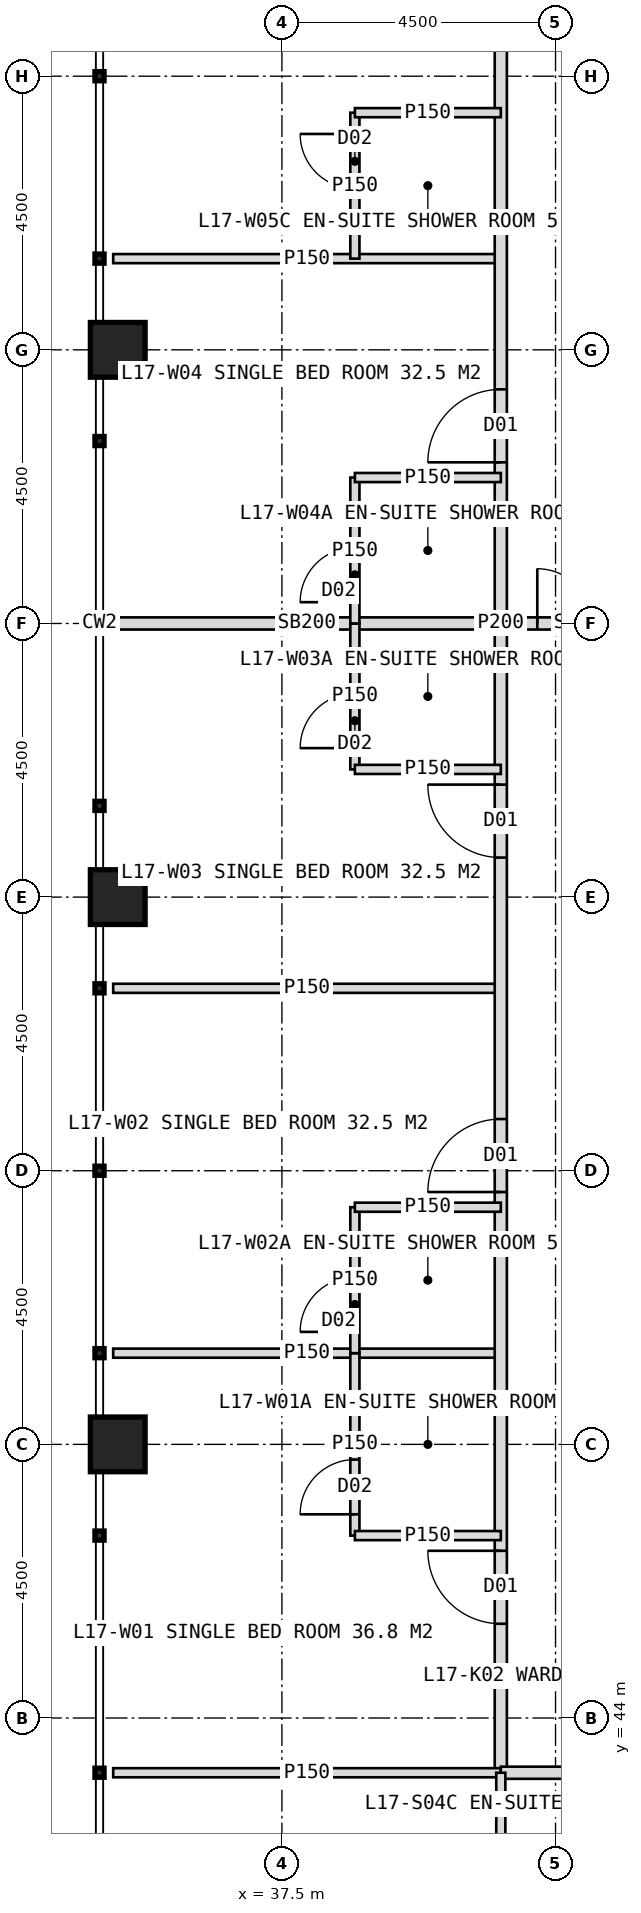
"""IFC4 building model, lengths in metres.
Left out: names, types, materials, properties, quantities, classifications, styles, units other than length and angle.
Written with IfcOpenShell. Run it as: python <this file> out.ifc"""

import sys

from ifc_helpers import new_model, si_unit, direction, frame, frame_2d, origin, origin_2d, place, context, subcontext, project, spatial, rectangle, hollow_rectangle, extrude, element, fill, save


model = new_model("IFC4")
c1 = context("Model", 3, precision=1e-05, world=origin(), true_north=direction((0.0, 1.0)))
c2 = subcontext(c1, "Body", "Model", "MODEL_VIEW")
j1 = project(units=[si_unit("LENGTHUNIT", "METRE"), si_unit("PLANEANGLEUNIT", "RADIAN")], contexts=[c1])
p1 = place(None, origin())
s1 = spatial("IfcSite", under=j1, at=p1, CompositionType="ELEMENT")
p2 = place(p1, origin())
s2 = spatial("IfcBuilding", under=s1, at=p2, CompositionType="ELEMENT")
p3 = place(p2, frame((0.0, 0.0, 75.0)))
s3 = spatial("IfcBuildingStorey", under=s2, at=p3, CompositionType="ELEMENT", Elevation=75.0)
for number, where, z_axis, x_axis in (
    (1, (34.8, 48.5, 0.0), (0.0, 0.0, 1.0), (1.0, 0.0, 0.0)),
    (2, (34.8, 57.5, 0.0), (0.0, 0.0, 1.0), (1.0, 0.0, 0.0)),
    (3, (34.8, 66.5, 0.0), (0.0, 0.0, 1.0), (1.0, 0.0, 0.0)),
):
    element("IfcColumn", number, at=place(p3, frame(where, z_axis=z_axis, x_axis=x_axis)), inside=s3, PredefinedType="COLUMN", context=c2, shape_type="SweptSolid", body=[
        extrude(hollow_rectangle(XDim=0.9, YDim=0.9, WallThickness=0.08, at=origin_2d()), origin(), (0.0, 0.0, 1.0), 4.0),
    ])
for number, where, z_axis, x_axis in (
    (4, (41.1, 50.0, 0.0), (0.0, 0.0, 1.0), (-1.0, 0.0, 0.0)),
    (5, (41.1, 56.0, 0.0), (0.0, 0.0, 1.0), (-1.0, 0.0, 0.0)),
):
    element("IfcWall", number, at=place(p3, frame(where, z_axis=z_axis, x_axis=x_axis)), inside=s3, PredefinedType="PARTITIONING", context=c2, shape_type="SweptSolid", body=[
        extrude(rectangle(XDim=6.375, YDim=0.15, at=frame_2d((3.188, 0.0))), origin(), (0.0, 0.0, 1.0), 3.75),
    ])
p4 = place(p3, frame((41.1, 62.0, 0.0), z_axis=(0.0, 0.0, 1.0), x_axis=(-1.0, 0.0, 0.0)))
e6 = element("IfcWall", 6, at=p4, inside=s3, PredefinedType="SOLIDWALL", context=c2, shape_type="SweptSolid", body=[
    extrude(rectangle(XDim=6.375, YDim=0.2, at=frame_2d((3.188, 0.0))), origin(), (0.0, 0.0, 1.0), 2.75),
])
p5 = place(p3, frame((41.1, 68.0, 0.0), z_axis=(0.0, 0.0, 1.0), x_axis=(-1.0, 0.0, 0.0)))
e7 = element("IfcWall", 7, at=p5, inside=s3, PredefinedType="PARTITIONING", context=c2, shape_type="SweptSolid", body=[
    extrude(rectangle(XDim=6.375, YDim=0.15, at=frame_2d((3.188, 0.0))), origin(), (0.0, 0.0, 1.0), 3.75),
])
p6 = place(p3, frame((41.1, 43.1, 0.0), z_axis=(0.0, 0.0, 1.0), x_axis=(0.0, 1.0, 0.0)))
e8 = element("IfcWall", 8, at=p6, inside=s3, PredefinedType="PARTITIONING", context=c2, shape_type="SweptSolid", body=[
    extrude(rectangle(XDim=37.8, YDim=0.2, at=frame_2d((18.9, 0.0))), origin(), (0.0, 0.0, 1.0), 3.75),
])
p7 = place(p6, frame((2.45, 0.0, 0.0)))
e9 = element("IfcOpeningElement", 9, at=p7, cuts=e8, PredefinedType="OPENING", context=c2, shape_type="SweptSolid", body=[
    extrude(rectangle(XDim=1.2, YDim=2.2, at=frame_2d((0.6, 1.1))), frame((0.0, 0.11, 0.0), z_axis=(0.0, -1.0, 0.0), x_axis=(1.0, 0.0, 0.0)), (0.0, 0.0, 1.0), 0.22),
])
p8 = place(p6, frame((9.55, 0.0, 0.0)))
e10 = element("IfcOpeningElement", 10, at=p8, cuts=e8, PredefinedType="OPENING", context=c2, shape_type="SweptSolid", body=[
    extrude(rectangle(XDim=1.2, YDim=2.2, at=frame_2d((0.6, 1.1))), frame((0.0, 0.11, 0.0), z_axis=(0.0, -1.0, 0.0), x_axis=(1.0, 0.0, 0.0)), (0.0, 0.0, 1.0), 0.22),
])
p9 = place(p6, frame((15.05, 0.0, 0.0)))
e11 = element("IfcOpeningElement", 11, at=p9, cuts=e8, PredefinedType="OPENING", context=c2, shape_type="SweptSolid", body=[
    extrude(rectangle(XDim=1.2, YDim=2.2, at=frame_2d((0.6, 1.1))), frame((0.0, 0.11, 0.0), z_axis=(0.0, -1.0, 0.0), x_axis=(1.0, 0.0, 0.0)), (0.0, 0.0, 1.0), 0.22),
])
p10 = place(p6, frame((21.55, 0.0, 0.0)))
e12 = element("IfcOpeningElement", 12, at=p10, cuts=e8, PredefinedType="OPENING", context=c2, shape_type="SweptSolid", body=[
    extrude(rectangle(XDim=1.2, YDim=2.2, at=frame_2d((0.6, 1.1))), frame((0.0, 0.11, 0.0), z_axis=(0.0, -1.0, 0.0), x_axis=(1.0, 0.0, 0.0)), (0.0, 0.0, 1.0), 0.22),
])
p11 = place(p6, frame((33.95, 0.0, 0.0)))
e13 = element("IfcOpeningElement", 13, at=p11, cuts=e8, PredefinedType="OPENING", context=c2, shape_type="SweptSolid", body=[
    extrude(rectangle(XDim=1.2, YDim=2.2, at=frame_2d((0.6, 1.1))), frame((0.0, 0.11, 0.0), z_axis=(0.0, -1.0, 0.0), x_axis=(1.0, 0.0, 0.0)), (0.0, 0.0, 1.0), 0.22),
])
p12 = place(p3, frame((41.1, 43.1, 0.0), z_axis=(0.0, 0.0, 1.0), x_axis=(-1.0, 0.0, 0.0)))
e14 = element("IfcWall", 14, at=p12, inside=s3, PredefinedType="PARTITIONING", context=c2, shape_type="SweptSolid", body=[
    extrude(rectangle(XDim=6.375, YDim=0.15, at=frame_2d((3.188, 0.0))), origin(), (0.0, 0.0, 1.0), 3.75),
])
p13 = place(p3, frame((38.7, 47.0, 0.0), z_axis=(0.0, 0.0, 1.0), x_axis=(0.0, 1.0, 0.0)))
e15 = element("IfcWall", 15, at=p13, inside=s3, PredefinedType="PARTITIONING", context=c2, shape_type="SweptSolid", body=[
    extrude(rectangle(XDim=3.0, YDim=0.15, at=frame_2d((1.5, 0.0))), origin(), (0.0, 0.0, 1.0), 3.75),
])
p14 = place(p13, frame((0.35, 0.0, 0.0)))
e16 = element("IfcOpeningElement", 16, at=p14, cuts=e15, PredefinedType="OPENING", context=c2, shape_type="SweptSolid", body=[
    extrude(rectangle(XDim=0.9, YDim=2.1, at=frame_2d((0.45, 1.05))), frame((0.0, 0.085, 0.0), z_axis=(0.0, -1.0, 0.0), x_axis=(1.0, 0.0, 0.0)), (0.0, 0.0, 1.0), 0.17),
])
p15 = place(p3, frame((41.1, 47.0, 0.0), z_axis=(0.0, 0.0, 1.0), x_axis=(-1.0, 0.0, 0.0)))
e17 = element("IfcWall", 17, at=p15, inside=s3, PredefinedType="PARTITIONING", context=c2, shape_type="SweptSolid", body=[
    extrude(rectangle(XDim=2.4, YDim=0.15, at=frame_2d((1.2, 0.0))), origin(), (0.0, 0.0, 1.0), 3.75),
])
p16 = place(p3, frame((38.7, 50.0, 0.0), z_axis=(0.0, 0.0, 1.0), x_axis=(0.0, 1.0, 0.0)))
e18 = element("IfcWall", 18, at=p16, inside=s3, PredefinedType="PARTITIONING", context=c2, shape_type="SweptSolid", body=[
    extrude(rectangle(XDim=2.4, YDim=0.15, at=frame_2d((1.2, 0.0))), origin(), (0.0, 0.0, 1.0), 3.75),
])
p17 = place(p16, frame((0.35, 0.0, 0.0)))
e19 = element("IfcOpeningElement", 19, at=p17, cuts=e18, PredefinedType="OPENING", context=c2, shape_type="SweptSolid", body=[
    extrude(rectangle(XDim=0.9, YDim=2.1, at=frame_2d((0.45, 1.05))), frame((0.0, 0.085, 0.0), z_axis=(0.0, -1.0, 0.0), x_axis=(1.0, 0.0, 0.0)), (0.0, 0.0, 1.0), 0.17),
])
p18 = place(p3, frame((41.1, 52.4, 0.0), z_axis=(0.0, 0.0, 1.0), x_axis=(-1.0, 0.0, 0.0)))
e20 = element("IfcWall", 20, at=p18, inside=s3, PredefinedType="PARTITIONING", context=c2, shape_type="SweptSolid", body=[
    extrude(rectangle(XDim=2.4, YDim=0.15, at=frame_2d((1.2, 0.0))), origin(), (0.0, 0.0, 1.0), 3.75),
])
p19 = place(p3, frame((38.7, 59.6, 0.0), z_axis=(0.0, 0.0, 1.0), x_axis=(0.0, 1.0, 0.0)))
e21 = element("IfcWall", 21, at=p19, inside=s3, PredefinedType="PARTITIONING", context=c2, shape_type="SweptSolid", body=[
    extrude(rectangle(XDim=2.4, YDim=0.15, at=frame_2d((1.2, 0.0))), origin(), (0.0, 0.0, 1.0), 3.75),
])
p20 = place(p19, frame((0.35, 0.0, 0.0)))
e22 = element("IfcOpeningElement", 22, at=p20, cuts=e21, PredefinedType="OPENING", context=c2, shape_type="SweptSolid", body=[
    extrude(rectangle(XDim=0.9, YDim=2.1, at=frame_2d((0.45, 1.05))), frame((0.0, 0.085, 0.0), z_axis=(0.0, -1.0, 0.0), x_axis=(1.0, 0.0, 0.0)), (0.0, 0.0, 1.0), 0.17),
])
p21 = place(p3, frame((41.1, 59.6, 0.0), z_axis=(0.0, 0.0, 1.0), x_axis=(-1.0, 0.0, 0.0)))
e23 = element("IfcWall", 23, at=p21, inside=s3, PredefinedType="PARTITIONING", context=c2, shape_type="SweptSolid", body=[
    extrude(rectangle(XDim=2.4, YDim=0.15, at=frame_2d((1.2, 0.0))), origin(), (0.0, 0.0, 1.0), 3.75),
])
p22 = place(p3, frame((38.7, 62.0, 0.0), z_axis=(0.0, 0.0, 1.0), x_axis=(0.0, 1.0, 0.0)))
e24 = element("IfcWall", 24, at=p22, inside=s3, PredefinedType="PARTITIONING", context=c2, shape_type="SweptSolid", body=[
    extrude(rectangle(XDim=2.4, YDim=0.15, at=frame_2d((1.2, 0.0))), origin(), (0.0, 0.0, 1.0), 3.75),
])
p23 = place(p22, frame((0.35, 0.0, 0.0)))
e25 = element("IfcOpeningElement", 25, at=p23, cuts=e24, PredefinedType="OPENING", context=c2, shape_type="SweptSolid", body=[
    extrude(rectangle(XDim=0.9, YDim=2.1, at=frame_2d((0.45, 1.05))), frame((0.0, 0.085, 0.0), z_axis=(0.0, -1.0, 0.0), x_axis=(1.0, 0.0, 0.0)), (0.0, 0.0, 1.0), 0.17),
])
p24 = place(p3, frame((41.1, 64.4, 0.0), z_axis=(0.0, 0.0, 1.0), x_axis=(-1.0, 0.0, 0.0)))
e26 = element("IfcWall", 26, at=p24, inside=s3, PredefinedType="PARTITIONING", context=c2, shape_type="SweptSolid", body=[
    extrude(rectangle(XDim=2.4, YDim=0.15, at=frame_2d((1.2, 0.0))), origin(), (0.0, 0.0, 1.0), 3.75),
])
p25 = place(p3, frame((38.7, 68.0, 0.0), z_axis=(0.0, 0.0, 1.0), x_axis=(0.0, 1.0, 0.0)))
e27 = element("IfcWall", 27, at=p25, inside=s3, PredefinedType="PARTITIONING", context=c2, shape_type="SweptSolid", body=[
    extrude(rectangle(XDim=2.4, YDim=0.15, at=frame_2d((1.2, 0.0))), origin(), (0.0, 0.0, 1.0), 3.75),
])
p26 = place(p25, frame((1.15, 0.0, 0.0)))
e28 = element("IfcOpeningElement", 28, at=p26, cuts=e27, PredefinedType="OPENING", context=c2, shape_type="SweptSolid", body=[
    extrude(rectangle(XDim=0.9, YDim=2.1, at=frame_2d((0.45, 1.05))), frame((0.0, 0.085, 0.0), z_axis=(0.0, -1.0, 0.0), x_axis=(1.0, 0.0, 0.0)), (0.0, 0.0, 1.0), 0.17),
])
p27 = place(p3, frame((41.1, 70.4, 0.0), z_axis=(0.0, 0.0, 1.0), x_axis=(-1.0, 0.0, 0.0)))
e29 = element("IfcWall", 29, at=p27, inside=s3, PredefinedType="PARTITIONING", context=c2, shape_type="SweptSolid", body=[
    extrude(rectangle(XDim=2.4, YDim=0.15, at=frame_2d((1.2, 0.0))), origin(), (0.0, 0.0, 1.0), 3.75),
])
p28 = place(p3, frame((78.9, 43.1, 0.0), z_axis=(0.0, 0.0, 1.0), x_axis=(-1.0, 0.0, 0.0)))
e30 = element("IfcWall", 30, at=p28, inside=s3, PredefinedType="PARTITIONING", context=c2, shape_type="SweptSolid", body=[
    extrude(rectangle(XDim=37.8, YDim=0.2, at=frame_2d((18.9, 0.0))), origin(), (0.0, 0.0, 1.0), 3.75),
])
p29 = place(p28, frame((6.05, 0.0, 0.0)))
e31 = element("IfcOpeningElement", 31, at=p29, cuts=e30, PredefinedType="OPENING", context=c2, shape_type="SweptSolid", body=[
    extrude(rectangle(XDim=1.2, YDim=2.2, at=frame_2d((0.6, 1.1))), frame((0.0, 0.11, 0.0), z_axis=(0.0, -1.0, 0.0), x_axis=(1.0, 0.0, 0.0)), (0.0, 0.0, 1.0), 0.22),
])
p30 = place(p28, frame((12.55, 0.0, 0.0)))
e32 = element("IfcOpeningElement", 32, at=p30, cuts=e30, PredefinedType="OPENING", context=c2, shape_type="SweptSolid", body=[
    extrude(rectangle(XDim=1.2, YDim=2.2, at=frame_2d((0.6, 1.1))), frame((0.0, 0.11, 0.0), z_axis=(0.0, -1.0, 0.0), x_axis=(1.0, 0.0, 0.0)), (0.0, 0.0, 1.0), 0.22),
])
p31 = place(p28, frame((21.05, 0.0, 0.0)))
e33 = element("IfcOpeningElement", 33, at=p31, cuts=e30, PredefinedType="OPENING", context=c2, shape_type="SweptSolid", body=[
    extrude(rectangle(XDim=1.2, YDim=2.2, at=frame_2d((0.6, 1.1))), frame((0.0, 0.11, 0.0), z_axis=(0.0, -1.0, 0.0), x_axis=(1.0, 0.0, 0.0)), (0.0, 0.0, 1.0), 0.22),
])
p32 = place(p28, frame((27.55, 0.0, 0.0)))
e34 = element("IfcOpeningElement", 34, at=p32, cuts=e30, PredefinedType="OPENING", context=c2, shape_type="SweptSolid", body=[
    extrude(rectangle(XDim=1.2, YDim=2.2, at=frame_2d((0.6, 1.1))), frame((0.0, 0.11, 0.0), z_axis=(0.0, -1.0, 0.0), x_axis=(1.0, 0.0, 0.0)), (0.0, 0.0, 1.0), 0.22),
])
p33 = place(p3, frame((41.1, 43.1, 0.0), z_axis=(0.0, 0.0, 1.0), x_axis=(0.0, -1.0, 0.0)))
e35 = element("IfcWall", 35, at=p33, inside=s3, PredefinedType="PARTITIONING", context=c2, shape_type="SweptSolid", body=[
    extrude(rectangle(XDim=2.4, YDim=0.15, at=frame_2d((1.2, 0.0))), origin(), (0.0, 0.0, 1.0), 3.75),
])
p34 = place(p3, frame((43.8, 62.0, 0.0), z_axis=(0.0, 0.0, 1.0), x_axis=(-1.0, 0.0, 0.0)))
e36 = element("IfcWall", 36, at=p34, inside=s3, PredefinedType="SOLIDWALL", context=c2, shape_type="SweptSolid", body=[
    extrude(rectangle(XDim=2.7, YDim=0.2, at=frame_2d((1.35, 0.0))), origin(), (0.0, 0.0, 1.0), 2.75),
])
p35 = place(p34, frame((0.3, 0.0, 0.0)))
e37 = element("IfcOpeningElement", 37, at=p35, cuts=e36, PredefinedType="OPENING", context=c2, shape_type="SweptSolid", body=[
    extrude(rectangle(XDim=1.8, YDim=2.2, at=frame_2d((0.9, 1.1))), frame((0.0, 0.11, 0.0), z_axis=(0.0, -1.0, 0.0), x_axis=(1.0, 0.0, 0.0)), (0.0, 0.0, 1.0), 0.22),
])
p36 = place(p7, origin())
e38 = element("IfcDoor", 38, at=p36, inside=s3, OperationType="SINGLE_SWING_RIGHT", PredefinedType="DOOR", context=c2, shape_type="SweptSolid", body=[
    extrude(rectangle(XDim=1.2, YDim=2.2, at=frame_2d((0.6, 1.1))), frame((0.0, 0.025, 0.0), z_axis=(0.0, -1.0, 0.0), x_axis=(1.0, 0.0, 0.0)), (0.0, 0.0, 1.0), 0.05),
])
fill(e9, e38)
p37 = place(p14, origin())
e39 = element("IfcDoor", 39, at=p37, inside=s3, OperationType="SINGLE_SWING_LEFT", PredefinedType="DOOR", context=c2, shape_type="SweptSolid", body=[
    extrude(rectangle(XDim=0.9, YDim=2.1, at=frame_2d((0.45, 1.05))), frame((0.0, 0.025, 0.0), z_axis=(0.0, -1.0, 0.0), x_axis=(1.0, 0.0, 0.0)), (0.0, 0.0, 1.0), 0.05),
])
fill(e16, e39)
p38 = place(p8, origin())
e40 = element("IfcDoor", 40, at=p38, inside=s3, OperationType="SINGLE_SWING_LEFT", PredefinedType="DOOR", context=c2, shape_type="SweptSolid", body=[
    extrude(rectangle(XDim=1.2, YDim=2.2, at=frame_2d((0.6, 1.1))), frame((0.0, 0.025, 0.0), z_axis=(0.0, -1.0, 0.0), x_axis=(1.0, 0.0, 0.0)), (0.0, 0.0, 1.0), 0.05),
])
fill(e10, e40)
p39 = place(p17, origin())
e41 = element("IfcDoor", 41, at=p39, inside=s3, OperationType="SINGLE_SWING_LEFT", PredefinedType="DOOR", context=c2, shape_type="SweptSolid", body=[
    extrude(rectangle(XDim=0.9, YDim=2.1, at=frame_2d((0.45, 1.05))), frame((0.0, 0.025, 0.0), z_axis=(0.0, -1.0, 0.0), x_axis=(1.0, 0.0, 0.0)), (0.0, 0.0, 1.0), 0.05),
])
fill(e19, e41)
p40 = place(p9, origin())
e42 = element("IfcDoor", 42, at=p40, inside=s3, OperationType="SINGLE_SWING_RIGHT", PredefinedType="DOOR", context=c2, shape_type="SweptSolid", body=[
    extrude(rectangle(XDim=1.2, YDim=2.2, at=frame_2d((0.6, 1.1))), frame((0.0, 0.025, 0.0), z_axis=(0.0, -1.0, 0.0), x_axis=(1.0, 0.0, 0.0)), (0.0, 0.0, 1.0), 0.05),
])
fill(e11, e42)
p41 = place(p20, origin())
e43 = element("IfcDoor", 43, at=p41, inside=s3, OperationType="SINGLE_SWING_LEFT", PredefinedType="DOOR", context=c2, shape_type="SweptSolid", body=[
    extrude(rectangle(XDim=0.9, YDim=2.1, at=frame_2d((0.45, 1.05))), frame((0.0, 0.025, 0.0), z_axis=(0.0, -1.0, 0.0), x_axis=(1.0, 0.0, 0.0)), (0.0, 0.0, 1.0), 0.05),
])
fill(e22, e43)
p42 = place(p10, origin())
e44 = element("IfcDoor", 44, at=p42, inside=s3, OperationType="SINGLE_SWING_LEFT", PredefinedType="DOOR", context=c2, shape_type="SweptSolid", body=[
    extrude(rectangle(XDim=1.2, YDim=2.2, at=frame_2d((0.6, 1.1))), frame((0.0, 0.025, 0.0), z_axis=(0.0, -1.0, 0.0), x_axis=(1.0, 0.0, 0.0)), (0.0, 0.0, 1.0), 0.05),
])
fill(e12, e44)
p43 = place(p23, origin())
e45 = element("IfcDoor", 45, at=p43, inside=s3, OperationType="SINGLE_SWING_LEFT", PredefinedType="DOOR", context=c2, shape_type="SweptSolid", body=[
    extrude(rectangle(XDim=0.9, YDim=2.1, at=frame_2d((0.45, 1.05))), frame((0.0, 0.025, 0.0), z_axis=(0.0, -1.0, 0.0), x_axis=(1.0, 0.0, 0.0)), (0.0, 0.0, 1.0), 0.05),
])
fill(e25, e45)
p44 = place(p26, origin())
e46 = element("IfcDoor", 46, at=p44, inside=s3, OperationType="SINGLE_SWING_RIGHT", PredefinedType="DOOR", context=c2, shape_type="SweptSolid", body=[
    extrude(rectangle(XDim=0.9, YDim=2.1, at=frame_2d((0.45, 1.05))), frame((0.0, 0.025, 0.0), z_axis=(0.0, -1.0, 0.0), x_axis=(1.0, 0.0, 0.0)), (0.0, 0.0, 1.0), 0.05),
])
fill(e28, e46)
p45 = place(p35, origin())
e47 = element("IfcDoor", 47, at=p45, inside=s3, OperationType="DOUBLE_DOOR_DOUBLE_SWING", PredefinedType="DOOR", context=c2, shape_type="SweptSolid", body=[
    extrude(rectangle(XDim=1.8, YDim=2.2, at=frame_2d((0.9, 1.1))), frame((0.0, 0.025, 0.0), z_axis=(0.0, -1.0, 0.0), x_axis=(1.0, 0.0, 0.0)), (0.0, 0.0, 1.0), 0.05),
])
fill(e37, e47)
save(model, sys.argv[1])
